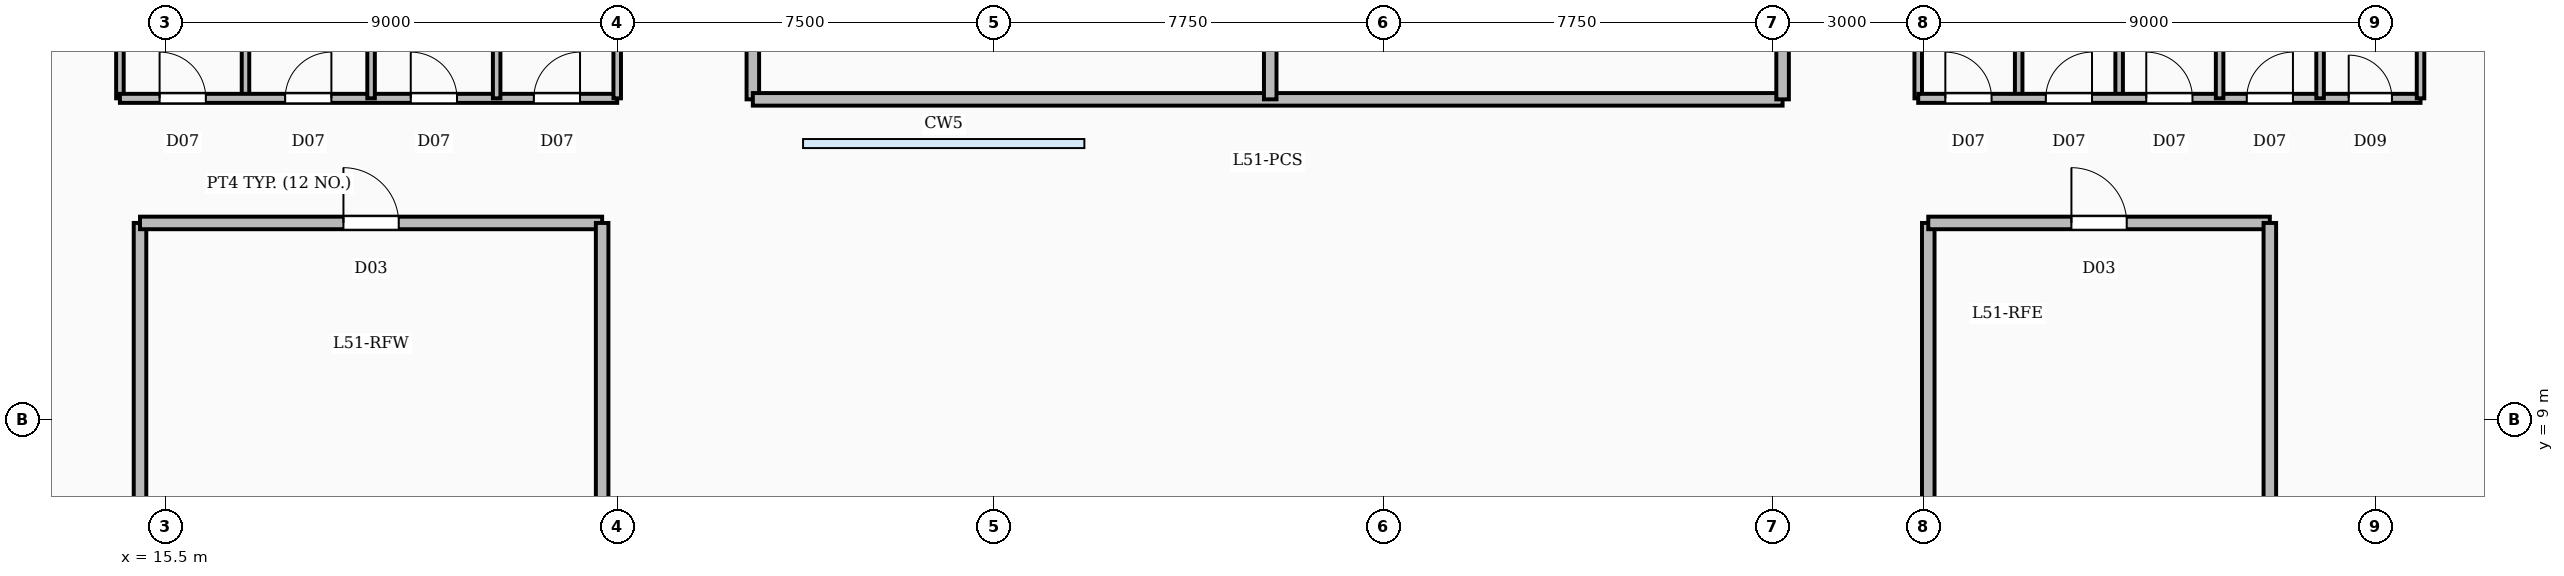
"""IFC4 building model, lengths in metres.
Left out: names, types, materials, properties, quantities, classifications, styles, units other than length and angle.
Written with IfcOpenShell. Run it as: python <this file> out.ifc"""

import sys

from ifc_helpers import new_model, si_unit, direction, frame, frame_2d, origin, place, context, subcontext, project, spatial, rectangle, extrude, element, fill, save


model = new_model("IFC4")
c1 = context("Model", 3, precision=1e-05, world=origin(), true_north=direction((0.0, 1.0)))
c2 = subcontext(c1, "Body", "Model", "MODEL_VIEW")
j1 = project(units=[si_unit("LENGTHUNIT", "METRE"), si_unit("PLANEANGLEUNIT", "RADIAN")], contexts=[c1])
p1 = place(None, origin())
s1 = spatial("IfcSite", under=j1, at=p1, CompositionType="ELEMENT")
p2 = place(p1, origin())
s2 = spatial("IfcBuilding", under=s1, at=p2, CompositionType="ELEMENT")
p3 = place(p2, frame((0.0, 0.0, 210.95)))
s3 = spatial("IfcBuildingStorey", under=s2, at=p3, CompositionType="ELEMENT", Elevation=210.95)
for number, where, z_axis, x_axis in (
    (1, (17.1, 15.4, 0.0), (0.0, 0.0, 1.0), (0.0, 1.0, 0.0)),
    (2, (19.6, 15.4, 0.0), (0.0, 0.0, 1.0), (0.0, 1.0, 0.0)),
    (3, (22.1, 15.4, 0.0), (0.0, 0.0, 1.0), (0.0, 1.0, 0.0)),
):
    element("IfcWall", number, at=place(p3, frame(where, z_axis=z_axis, x_axis=x_axis)), inside=s3, PredefinedType="PARTITIONING", context=c2, shape_type="SweptSolid", body=[
        extrude(rectangle(XDim=3.58, YDim=0.15, at=frame_2d((1.79, 0.0))), origin(), (0.0, 0.0, 1.0), 3.81),
    ])
p4 = place(p3, frame((14.6, 15.4, 0.0), z_axis=(0.0, 0.0, 1.0), x_axis=(1.0, 0.0, 0.0)))
e4 = element("IfcWall", 4, at=p4, inside=s3, PredefinedType="PARTITIONING", context=c2, shape_type="SweptSolid", body=[
    extrude(rectangle(XDim=9.9, YDim=0.18, at=frame_2d((4.95, 0.0))), origin(), (0.0, 0.0, 1.0), 3.81),
])
p5 = place(p4, frame((0.79, 0.0, 0.0)))
e5 = element("IfcOpeningElement", 5, at=p5, cuts=e4, PredefinedType="OPENING", context=c2, shape_type="SweptSolid", body=[
    extrude(rectangle(XDim=0.92, YDim=2.1, at=frame_2d((0.46, 1.05))), frame((0.0, 0.1, 0.0), z_axis=(0.0, -1.0, 0.0), x_axis=(1.0, 0.0, 0.0)), (0.0, 0.0, 1.0), 0.2),
])
p6 = place(p4, frame((3.29, 0.0, 0.0)))
e6 = element("IfcOpeningElement", 6, at=p6, cuts=e4, PredefinedType="OPENING", context=c2, shape_type="SweptSolid", body=[
    extrude(rectangle(XDim=0.92, YDim=2.1, at=frame_2d((0.46, 1.05))), frame((0.0, 0.1, 0.0), z_axis=(0.0, -1.0, 0.0), x_axis=(1.0, 0.0, 0.0)), (0.0, 0.0, 1.0), 0.2),
])
p7 = place(p4, frame((5.79, 0.0, 0.0)))
e7 = element("IfcOpeningElement", 7, at=p7, cuts=e4, PredefinedType="OPENING", context=c2, shape_type="SweptSolid", body=[
    extrude(rectangle(XDim=0.92, YDim=2.1, at=frame_2d((0.46, 1.05))), frame((0.0, 0.1, 0.0), z_axis=(0.0, -1.0, 0.0), x_axis=(1.0, 0.0, 0.0)), (0.0, 0.0, 1.0), 0.2),
])
p8 = place(p4, frame((8.24, 0.0, 0.0)))
e8 = element("IfcOpeningElement", 8, at=p8, cuts=e4, PredefinedType="OPENING", context=c2, shape_type="SweptSolid", body=[
    extrude(rectangle(XDim=0.92, YDim=2.1, at=frame_2d((0.46, 1.05))), frame((0.0, 0.1, 0.0), z_axis=(0.0, -1.0, 0.0), x_axis=(1.0, 0.0, 0.0)), (0.0, 0.0, 1.0), 0.2),
])
for number, where, z_axis, x_axis in (
    (9, (14.6, 15.4, 0.0), (0.0, 0.0, 1.0), (0.0, 1.0, 0.0)),
    (10, (24.5, 15.4, 0.0), (0.0, 0.0, 1.0), (0.0, 1.0, 0.0)),
):
    element("IfcWall", number, at=place(p3, frame(where, z_axis=z_axis, x_axis=x_axis)), inside=s3, PredefinedType="PARTITIONING", context=c2, shape_type="SweptSolid", body=[
        extrude(rectangle(XDim=3.58, YDim=0.15, at=frame_2d((1.79, 0.0))), origin(), (0.0, 0.0, 1.0), 2.8),
    ])
for number, where, z_axis, x_axis in (
    (11, (52.4, 15.4, 0.0), (0.0, 0.0, 1.0), (0.0, 1.0, 0.0)),
    (12, (54.4, 15.4, 0.0), (0.0, 0.0, 1.0), (0.0, 1.0, 0.0)),
    (13, (56.4, 15.4, 0.0), (0.0, 0.0, 1.0), (0.0, 1.0, 0.0)),
    (14, (58.4, 15.4, 0.0), (0.0, 0.0, 1.0), (0.0, 1.0, 0.0)),
):
    element("IfcWall", number, at=place(p3, frame(where, z_axis=z_axis, x_axis=x_axis)), inside=s3, PredefinedType="PARTITIONING", context=c2, shape_type="SweptSolid", body=[
        extrude(rectangle(XDim=3.58, YDim=0.15, at=frame_2d((1.79, 0.0))), origin(), (0.0, 0.0, 1.0), 3.81),
    ])
p9 = place(p3, frame((50.4, 15.4, 0.0), z_axis=(0.0, 0.0, 1.0), x_axis=(1.0, 0.0, 0.0)))
e15 = element("IfcWall", 15, at=p9, inside=s3, PredefinedType="SOLIDWALL", context=c2, shape_type="SweptSolid", body=[
    extrude(rectangle(XDim=10.0, YDim=0.18, at=frame_2d((5.0, 0.0))), origin(), (0.0, 0.0, 1.0), 3.81),
])
p10 = place(p9, frame((0.54, 0.0, 0.0)))
e16 = element("IfcOpeningElement", 16, at=p10, cuts=e15, PredefinedType="OPENING", context=c2, shape_type="SweptSolid", body=[
    extrude(rectangle(XDim=0.92, YDim=2.1, at=frame_2d((0.46, 1.05))), frame((0.0, 0.1, 0.0), z_axis=(0.0, -1.0, 0.0), x_axis=(1.0, 0.0, 0.0)), (0.0, 0.0, 1.0), 0.2),
])
p11 = place(p9, frame((2.54, 0.0, 0.0)))
e17 = element("IfcOpeningElement", 17, at=p11, cuts=e15, PredefinedType="OPENING", context=c2, shape_type="SweptSolid", body=[
    extrude(rectangle(XDim=0.92, YDim=2.1, at=frame_2d((0.46, 1.05))), frame((0.0, 0.1, 0.0), z_axis=(0.0, -1.0, 0.0), x_axis=(1.0, 0.0, 0.0)), (0.0, 0.0, 1.0), 0.2),
])
p12 = place(p9, frame((4.54, 0.0, 0.0)))
e18 = element("IfcOpeningElement", 18, at=p12, cuts=e15, PredefinedType="OPENING", context=c2, shape_type="SweptSolid", body=[
    extrude(rectangle(XDim=0.92, YDim=2.1, at=frame_2d((0.46, 1.05))), frame((0.0, 0.1, 0.0), z_axis=(0.0, -1.0, 0.0), x_axis=(1.0, 0.0, 0.0)), (0.0, 0.0, 1.0), 0.2),
])
p13 = place(p9, frame((6.54, 0.0, 0.0)))
e19 = element("IfcOpeningElement", 19, at=p13, cuts=e15, PredefinedType="OPENING", context=c2, shape_type="SweptSolid", body=[
    extrude(rectangle(XDim=0.92, YDim=2.1, at=frame_2d((0.46, 1.05))), frame((0.0, 0.1, 0.0), z_axis=(0.0, -1.0, 0.0), x_axis=(1.0, 0.0, 0.0)), (0.0, 0.0, 1.0), 0.2),
])
p14 = place(p9, frame((8.57, 0.0, 0.0)))
e20 = element("IfcOpeningElement", 20, at=p14, cuts=e15, PredefinedType="OPENING", context=c2, shape_type="SweptSolid", body=[
    extrude(rectangle(XDim=0.86, YDim=2.05, at=frame_2d((0.43, 1.025))), frame((0.0, 0.1, 0.0), z_axis=(0.0, -1.0, 0.0), x_axis=(1.0, 0.0, 0.0)), (0.0, 0.0, 1.0), 0.2),
])
for number, where, z_axis, x_axis in (
    (21, (50.4, 15.4, 0.0), (0.0, 0.0, 1.0), (0.0, 1.0, 0.0)),
    (22, (60.4, 15.4, 0.0), (0.0, 0.0, 1.0), (0.0, 1.0, 0.0)),
):
    element("IfcWall", number, at=place(p3, frame(where, z_axis=z_axis, x_axis=x_axis)), inside=s3, PredefinedType="PARTITIONING", context=c2, shape_type="SweptSolid", body=[
        extrude(rectangle(XDim=3.58, YDim=0.15, at=frame_2d((1.79, 0.0))), origin(), (0.0, 0.0, 1.0), 2.8),
    ])
p15 = place(p3, frame((37.5, 15.38, 0.0), z_axis=(0.0, 0.0, 1.0), x_axis=(0.0, 1.0, 0.0)))
e23 = element("IfcWall", 23, at=p15, inside=s3, PredefinedType="SOLIDWALL", context=c2, shape_type="SweptSolid", body=[
    extrude(rectangle(XDim=20.84, YDim=0.25, at=frame_2d((10.42, 0.0))), origin(), (0.0, 0.0, 1.0), 3.81),
])
p16 = place(p3, frame((27.2, 15.38, 0.0), z_axis=(0.0, 0.0, 1.0), x_axis=(1.0, 0.0, 0.0)))
e24 = element("IfcWall", 24, at=p16, inside=s3, PredefinedType="SOLIDWALL", context=c2, shape_type="SweptSolid", body=[
    extrude(rectangle(XDim=20.5, YDim=0.25, at=frame_2d((10.25, 0.0))), origin(), (0.0, 0.0, 1.0), 3.81),
])
p17 = place(p3, frame((27.2, 15.38, 0.0), z_axis=(0.0, 0.0, 1.0), x_axis=(0.0, 1.0, 0.0)))
e25 = element("IfcWall", 25, at=p17, inside=s3, PredefinedType="SOLIDWALL", context=c2, shape_type="SweptSolid", body=[
    extrude(rectangle(XDim=20.84, YDim=0.25, at=frame_2d((10.42, 0.0))), origin(), (0.0, 0.0, 1.0), 3.81),
])
p18 = place(p17, frame((4.8, 0.0, 0.0)))
e26 = element("IfcOpeningElement", 26, at=p18, cuts=e25, PredefinedType="OPENING", context=c2, shape_type="SweptSolid", body=[
    extrude(rectangle(XDim=1.2, YDim=2.2, at=frame_2d((0.6, 1.1))), frame((0.0, 0.135, 0.0), z_axis=(0.0, -1.0, 0.0), x_axis=(1.0, 0.0, 0.0)), (0.0, 0.0, 1.0), 0.27),
])
p19 = place(p17, frame((14.5, 0.0, 0.0)))
e27 = element("IfcOpeningElement", 27, at=p19, cuts=e25, PredefinedType="OPENING", context=c2, shape_type="SweptSolid", body=[
    extrude(rectangle(XDim=1.2, YDim=2.2, at=frame_2d((0.6, 1.1))), frame((0.0, 0.135, 0.0), z_axis=(0.0, -1.0, 0.0), x_axis=(1.0, 0.0, 0.0)), (0.0, 0.0, 1.0), 0.27),
])
p20 = place(p3, frame((47.7, 15.38, 0.0), z_axis=(0.0, 0.0, 1.0), x_axis=(0.0, 1.0, 0.0)))
e28 = element("IfcWall", 28, at=p20, inside=s3, PredefinedType="SOLIDWALL", context=c2, shape_type="SweptSolid", body=[
    extrude(rectangle(XDim=20.84, YDim=0.25, at=frame_2d((10.42, 0.0))), origin(), (0.0, 0.0, 1.0), 3.81),
])
p21 = place(p20, frame((4.8, 0.0, 0.0)))
e29 = element("IfcOpeningElement", 29, at=p21, cuts=e28, PredefinedType="OPENING", context=c2, shape_type="SweptSolid", body=[
    extrude(rectangle(XDim=1.2, YDim=2.2, at=frame_2d((0.6, 1.1))), frame((0.0, 0.135, 0.0), z_axis=(0.0, -1.0, 0.0), x_axis=(1.0, 0.0, 0.0)), (0.0, 0.0, 1.0), 0.27),
])
p22 = place(p20, frame((14.5, 0.0, 0.0)))
e30 = element("IfcOpeningElement", 30, at=p22, cuts=e28, PredefinedType="OPENING", context=c2, shape_type="SweptSolid", body=[
    extrude(rectangle(XDim=1.2, YDim=2.2, at=frame_2d((0.6, 1.1))), frame((0.0, 0.135, 0.0), z_axis=(0.0, -1.0, 0.0), x_axis=(1.0, 0.0, 0.0)), (0.0, 0.0, 1.0), 0.27),
])
p23 = place(p3, frame((15.0, 12.92, 0.0), z_axis=(0.0, 0.0, 1.0), x_axis=(1.0, 0.0, 0.0)))
e31 = element("IfcWall", 31, at=p23, inside=s3, PredefinedType="SOLIDWALL", context=c2, shape_type="SweptSolid", body=[
    extrude(rectangle(XDim=9.2, YDim=0.25, at=frame_2d((4.6, 0.0))), origin(), (0.0, 0.0, 1.0), 3.81),
])
p24 = place(p23, frame((4.05, 0.0, 0.0)))
e32 = element("IfcOpeningElement", 32, at=p24, cuts=e31, PredefinedType="OPENING", context=c2, shape_type="SweptSolid", body=[
    extrude(rectangle(XDim=1.1, YDim=2.15, at=frame_2d((0.55, 1.075))), frame((0.0, 0.135, 0.0), z_axis=(0.0, -1.0, 0.0), x_axis=(1.0, 0.0, 0.0)), (0.0, 0.0, 1.0), 0.27),
])
p25 = place(p3, frame((15.0, 6.539, 0.0), z_axis=(0.0, 0.0, 1.0), x_axis=(0.0, 1.0, 0.0)))
e33 = element("IfcWall", 33, at=p25, inside=s3, PredefinedType="SOLIDWALL", context=c2, shape_type="SweptSolid", body=[
    extrude(rectangle(XDim=6.381, YDim=0.25, at=frame_2d((3.19, 0.0))), origin(), (0.0, 0.0, 1.0), 2.8),
])
p26 = place(p3, frame((24.2, 6.458, 0.0), z_axis=(0.0, 0.0, 1.0), x_axis=(0.0, 1.0, 0.0)))
e34 = element("IfcWall", 34, at=p26, inside=s3, PredefinedType="SOLIDWALL", context=c2, shape_type="SweptSolid", body=[
    extrude(rectangle(XDim=6.461, YDim=0.25, at=frame_2d((3.231, 0.0))), origin(), (0.0, 0.0, 1.0), 3.81),
])
p27 = place(p3, frame((50.6, 12.92, 0.0), z_axis=(0.0, 0.0, 1.0), x_axis=(1.0, 0.0, 0.0)))
e35 = element("IfcWall", 35, at=p27, inside=s3, PredefinedType="SOLIDWALL", context=c2, shape_type="SweptSolid", body=[
    extrude(rectangle(XDim=6.8, YDim=0.25, at=frame_2d((3.4, 0.0))), origin(), (0.0, 0.0, 1.0), 3.81),
])
p28 = place(p27, frame((2.85, 0.0, 0.0)))
e36 = element("IfcOpeningElement", 36, at=p28, cuts=e35, PredefinedType="OPENING", context=c2, shape_type="SweptSolid", body=[
    extrude(rectangle(XDim=1.1, YDim=2.15, at=frame_2d((0.55, 1.075))), frame((0.0, 0.135, 0.0), z_axis=(0.0, -1.0, 0.0), x_axis=(1.0, 0.0, 0.0)), (0.0, 0.0, 1.0), 0.27),
])
p29 = place(p3, frame((50.6, 6.228, 0.0), z_axis=(0.0, 0.0, 1.0), x_axis=(0.0, 1.0, 0.0)))
e37 = element("IfcWall", 37, at=p29, inside=s3, PredefinedType="SOLIDWALL", context=c2, shape_type="SweptSolid", body=[
    extrude(rectangle(XDim=6.692, YDim=0.25, at=frame_2d((3.346, 0.0))), origin(), (0.0, 0.0, 1.0), 2.8),
])
p30 = place(p3, frame((57.4, 6.169, 0.0), z_axis=(0.0, 0.0, 1.0), x_axis=(0.0, 1.0, 0.0)))
e38 = element("IfcWall", 38, at=p30, inside=s3, PredefinedType="SOLIDWALL", context=c2, shape_type="SweptSolid", body=[
    extrude(rectangle(XDim=6.751, YDim=0.25, at=frame_2d((3.375, 0.0))), origin(), (0.0, 0.0, 1.0), 3.81),
])
p31 = place(p5, origin())
e39 = element("IfcDoor", 39, at=p31, inside=s3, OperationType="SINGLE_SWING_LEFT", PredefinedType="DOOR", context=c2, shape_type="SweptSolid", body=[
    extrude(rectangle(XDim=0.92, YDim=2.1, at=frame_2d((0.46, 1.05))), frame((0.0, 0.025, 0.0), z_axis=(0.0, -1.0, 0.0), x_axis=(1.0, 0.0, 0.0)), (0.0, 0.0, 1.0), 0.05),
])
fill(e5, e39)
p32 = place(p6, origin())
e40 = element("IfcDoor", 40, at=p32, inside=s3, OperationType="SINGLE_SWING_RIGHT", PredefinedType="DOOR", context=c2, shape_type="SweptSolid", body=[
    extrude(rectangle(XDim=0.92, YDim=2.1, at=frame_2d((0.46, 1.05))), frame((0.0, 0.025, 0.0), z_axis=(0.0, -1.0, 0.0), x_axis=(1.0, 0.0, 0.0)), (0.0, 0.0, 1.0), 0.05),
])
fill(e6, e40)
p33 = place(p7, origin())
e41 = element("IfcDoor", 41, at=p33, inside=s3, OperationType="SINGLE_SWING_LEFT", PredefinedType="DOOR", context=c2, shape_type="SweptSolid", body=[
    extrude(rectangle(XDim=0.92, YDim=2.1, at=frame_2d((0.46, 1.05))), frame((0.0, 0.025, 0.0), z_axis=(0.0, -1.0, 0.0), x_axis=(1.0, 0.0, 0.0)), (0.0, 0.0, 1.0), 0.05),
])
fill(e7, e41)
p34 = place(p8, origin())
e42 = element("IfcDoor", 42, at=p34, inside=s3, OperationType="SINGLE_SWING_RIGHT", PredefinedType="DOOR", context=c2, shape_type="SweptSolid", body=[
    extrude(rectangle(XDim=0.92, YDim=2.1, at=frame_2d((0.46, 1.05))), frame((0.0, 0.025, 0.0), z_axis=(0.0, -1.0, 0.0), x_axis=(1.0, 0.0, 0.0)), (0.0, 0.0, 1.0), 0.05),
])
fill(e8, e42)
p35 = place(p10, origin())
e43 = element("IfcDoor", 43, at=p35, inside=s3, OperationType="SINGLE_SWING_LEFT", PredefinedType="DOOR", context=c2, shape_type="SweptSolid", body=[
    extrude(rectangle(XDim=0.92, YDim=2.1, at=frame_2d((0.46, 1.05))), frame((0.0, 0.025, 0.0), z_axis=(0.0, -1.0, 0.0), x_axis=(1.0, 0.0, 0.0)), (0.0, 0.0, 1.0), 0.05),
])
fill(e16, e43)
p36 = place(p11, origin())
e44 = element("IfcDoor", 44, at=p36, inside=s3, OperationType="SINGLE_SWING_RIGHT", PredefinedType="DOOR", context=c2, shape_type="SweptSolid", body=[
    extrude(rectangle(XDim=0.92, YDim=2.1, at=frame_2d((0.46, 1.05))), frame((0.0, 0.025, 0.0), z_axis=(0.0, -1.0, 0.0), x_axis=(1.0, 0.0, 0.0)), (0.0, 0.0, 1.0), 0.05),
])
fill(e17, e44)
p37 = place(p12, origin())
e45 = element("IfcDoor", 45, at=p37, inside=s3, OperationType="SINGLE_SWING_LEFT", PredefinedType="DOOR", context=c2, shape_type="SweptSolid", body=[
    extrude(rectangle(XDim=0.92, YDim=2.1, at=frame_2d((0.46, 1.05))), frame((0.0, 0.025, 0.0), z_axis=(0.0, -1.0, 0.0), x_axis=(1.0, 0.0, 0.0)), (0.0, 0.0, 1.0), 0.05),
])
fill(e18, e45)
p38 = place(p13, origin())
e46 = element("IfcDoor", 46, at=p38, inside=s3, OperationType="SINGLE_SWING_RIGHT", PredefinedType="DOOR", context=c2, shape_type="SweptSolid", body=[
    extrude(rectangle(XDim=0.92, YDim=2.1, at=frame_2d((0.46, 1.05))), frame((0.0, 0.025, 0.0), z_axis=(0.0, -1.0, 0.0), x_axis=(1.0, 0.0, 0.0)), (0.0, 0.0, 1.0), 0.05),
])
fill(e19, e46)
p39 = place(p14, origin())
e47 = element("IfcDoor", 47, at=p39, inside=s3, OperationType="SINGLE_SWING_LEFT", PredefinedType="DOOR", context=c2, shape_type="SweptSolid", body=[
    extrude(rectangle(XDim=0.86, YDim=2.05, at=frame_2d((0.43, 1.025))), frame((0.0, 0.025, 0.0), z_axis=(0.0, -1.0, 0.0), x_axis=(1.0, 0.0, 0.0)), (0.0, 0.0, 1.0), 0.05),
])
fill(e20, e47)
p40 = place(p24, origin())
e48 = element("IfcDoor", 48, at=p40, inside=s3, OperationType="SINGLE_SWING_LEFT", PredefinedType="DOOR", context=c2, shape_type="SweptSolid", body=[
    extrude(rectangle(XDim=1.1, YDim=2.15, at=frame_2d((0.55, 1.075))), frame((0.0, 0.025, 0.0), z_axis=(0.0, -1.0, 0.0), x_axis=(1.0, 0.0, 0.0)), (0.0, 0.0, 1.0), 0.05),
])
fill(e32, e48)
p41 = place(p28, origin())
e49 = element("IfcDoor", 49, at=p41, inside=s3, OperationType="SINGLE_SWING_LEFT", PredefinedType="DOOR", context=c2, shape_type="SweptSolid", body=[
    extrude(rectangle(XDim=1.1, YDim=2.15, at=frame_2d((0.55, 1.075))), frame((0.0, 0.025, 0.0), z_axis=(0.0, -1.0, 0.0), x_axis=(1.0, 0.0, 0.0)), (0.0, 0.0, 1.0), 0.05),
])
fill(e36, e49)
save(model, sys.argv[1])
